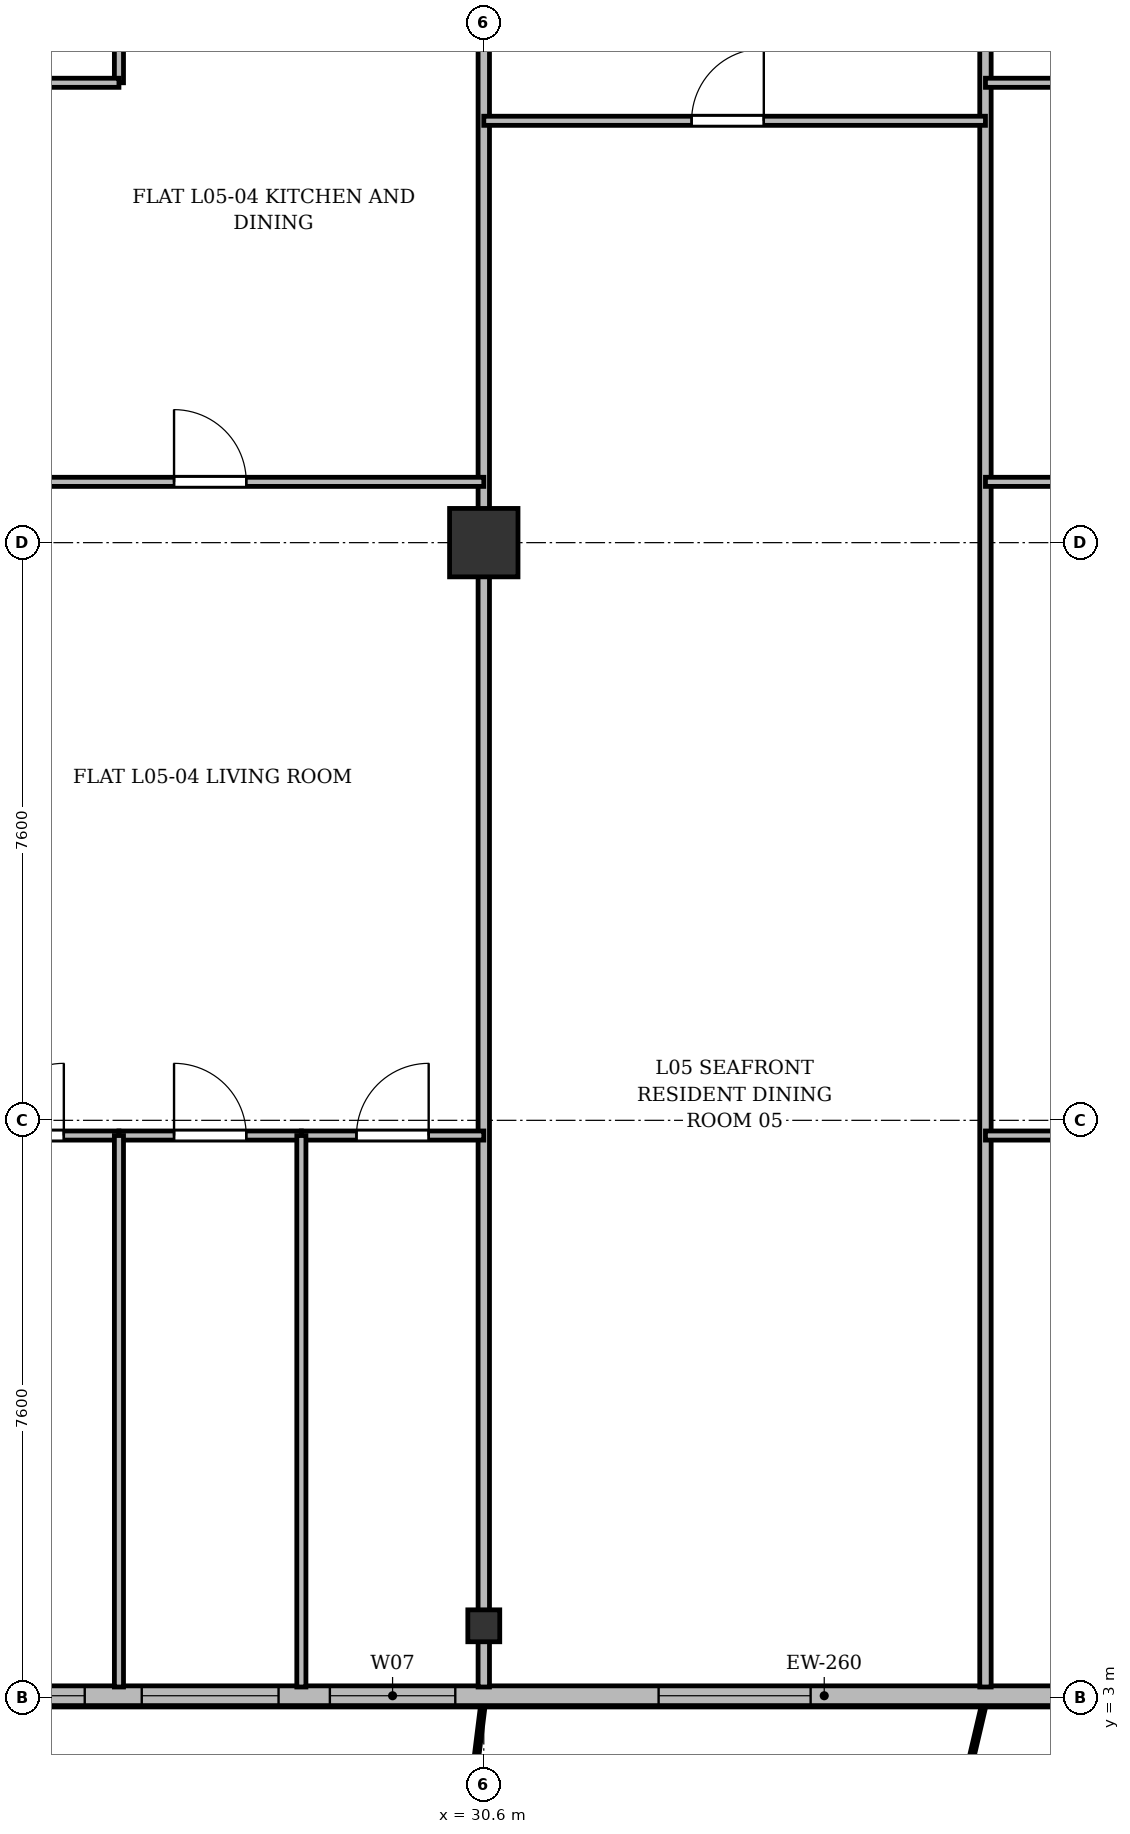
"""IFC4 building model, lengths in metres.
Left out: names, types, materials, properties, quantities, classifications, styles, units other than length and angle.
Written with IfcOpenShell. Run it as: python <this file> out.ifc"""

import sys

from ifc_helpers import new_model, si_unit, direction, frame, frame_2d, origin, origin_2d, place, context, subcontext, project, spatial, rectangle, i_section, extrude, source, transform, mapped, element, fill, save


model = new_model("IFC4")
c1 = context("Model", 3, precision=1e-05, world=origin(), true_north=direction((0.0, 1.0)))
c2 = subcontext(c1, "Body", "Model", "MODEL_VIEW")
j1 = project(units=[si_unit("LENGTHUNIT", "METRE"), si_unit("PLANEANGLEUNIT", "RADIAN")], contexts=[c1])
p1 = place(None, origin())
s1 = spatial("IfcSite", under=j1, at=p1, CompositionType="ELEMENT")
p2 = place(p1, origin())
s2 = spatial("IfcBuilding", under=s1, at=p2, CompositionType="ELEMENT")
p3 = place(p2, frame((0.0, 0.0, 23.5)))
s3 = spatial("IfcBuildingStorey", under=s2, at=p3, CompositionType="ELEMENT", Elevation=23.5)
m1 = source(origin(), c2, "Body", "SweptSolid", [
    extrude(i_section(OverallWidth=0.42, OverallDepth=0.42, WebThickness=0.026, FlangeThickness=0.04, at=origin_2d()), origin(), (0.0, 0.0, 1.0), 3.6),
])
p4 = place(p3, frame((30.6, 3.95, 0.0), z_axis=(0.0, 0.0, 1.0), x_axis=(1.0, 0.0, 0.0)))
e1 = element("IfcColumn", 1, at=p4, inside=s3, PredefinedType="COLUMN", context=c2, shape_type="MappedRepresentation", body=[
    mapped(m1, transform((0.0, 0.0, 0.0), x_axis=(1.0, 0.0, 0.0), y_axis=(0.0, 1.0, 0.0), z_axis=(0.0, 0.0, 1.0), scale=1.0)),
])
m2 = source(origin(), c2, "Body", "SweptSolid", [
    extrude(rectangle(XDim=0.9, YDim=0.9, at=origin_2d()), origin(), (0.0, 0.0, 1.0), 3.6),
])
p5 = place(p3, frame((30.6, 18.2, 0.0), z_axis=(0.0, 0.0, 1.0), x_axis=(1.0, 0.0, 0.0)))
e2 = element("IfcColumn", 2, at=p5, inside=s3, PredefinedType="COLUMN", context=c2, shape_type="MappedRepresentation", body=[
    mapped(m2, transform((0.0, 0.0, 0.0), x_axis=(1.0, 0.0, 0.0), y_axis=(0.0, 1.0, 0.0), z_axis=(0.0, 0.0, 1.0), scale=1.0)),
])
p6 = place(p3, frame((66.9, 3.03, 0.0), z_axis=(0.0, 0.0, 1.0), x_axis=(-1.0, 0.0, 0.0)))
e3 = element("IfcWall", 3, at=p6, inside=s3, PredefinedType="SOLIDWALL", context=c2, shape_type="SweptSolid", body=[
    extrude(rectangle(XDim=59.4, YDim=0.26, at=frame_2d((29.7, 0.0))), origin(), (0.0, 0.0, 1.0), 3.34),
])
p7 = place(p6, frame((3.6, 0.0, 0.9)))
e4 = element("IfcOpeningElement", 4, at=p7, cuts=e3, PredefinedType="OPENING", context=c2, shape_type="SweptSolid", body=[
    extrude(rectangle(XDim=2.2, YDim=1.8, at=frame_2d((1.1, 0.9))), frame((0.0, 0.14, 0.0), z_axis=(0.0, -1.0, 0.0), x_axis=(1.0, 0.0, 0.0)), (0.0, 0.0, 1.0), 0.28),
])
p8 = place(p6, frame((9.3, 0.0, 0.9)))
e5 = element("IfcOpeningElement", 5, at=p8, cuts=e3, PredefinedType="OPENING", context=c2, shape_type="SweptSolid", body=[
    extrude(rectangle(XDim=1.5, YDim=1.75, at=frame_2d((0.75, 0.875))), frame((0.0, 0.14, 0.0), z_axis=(0.0, -1.0, 0.0), x_axis=(1.0, 0.0, 0.0)), (0.0, 0.0, 1.0), 0.28),
])
p9 = place(p6, frame((12.95, 0.0, 0.9)))
e6 = element("IfcOpeningElement", 6, at=p9, cuts=e3, PredefinedType="OPENING", context=c2, shape_type="SweptSolid", body=[
    extrude(rectangle(XDim=2.0, YDim=1.95, at=frame_2d((1.0, 0.975))), frame((0.0, 0.14, 0.0), z_axis=(0.0, -1.0, 0.0), x_axis=(1.0, 0.0, 0.0)), (0.0, 0.0, 1.0), 0.28),
])
p10 = place(p6, frame((17.007, 0.0, 0.0)))
e7 = element("IfcOpeningElement", 7, at=p10, cuts=e3, PredefinedType="OPENING", context=c2, shape_type="SweptSolid", body=[
    extrude(rectangle(XDim=1.2, YDim=2.2, at=frame_2d((0.6, 1.1))), frame((0.0, 0.14, 0.0), z_axis=(0.0, -1.0, 0.0), x_axis=(1.0, 0.0, 0.0)), (0.0, 0.0, 1.0), 0.28),
])
p11 = place(p6, frame((20.4, 0.0, 0.9)))
e8 = element("IfcOpeningElement", 8, at=p11, cuts=e3, PredefinedType="OPENING", context=c2, shape_type="SweptSolid", body=[
    extrude(rectangle(XDim=1.8, YDim=1.8, at=frame_2d((0.9, 0.9))), frame((0.0, 0.14, 0.0), z_axis=(0.0, -1.0, 0.0), x_axis=(1.0, 0.0, 0.0)), (0.0, 0.0, 1.0), 0.28),
])
p12 = place(p6, frame((23.65, 0.0, 0.9)))
e9 = element("IfcOpeningElement", 9, at=p12, cuts=e3, PredefinedType="OPENING", context=c2, shape_type="SweptSolid", body=[
    extrude(rectangle(XDim=2.2, YDim=1.8, at=frame_2d((1.1, 0.9))), frame((0.0, 0.14, 0.0), z_axis=(0.0, -1.0, 0.0), x_axis=(1.0, 0.0, 0.0)), (0.0, 0.0, 1.0), 0.28),
])
p13 = place(p6, frame((27.3, 0.0, 0.9)))
e10 = element("IfcOpeningElement", 10, at=p13, cuts=e3, PredefinedType="OPENING", context=c2, shape_type="SweptSolid", body=[
    extrude(rectangle(XDim=1.5, YDim=1.75, at=frame_2d((0.75, 0.875))), frame((0.0, 0.14, 0.0), z_axis=(0.0, -1.0, 0.0), x_axis=(1.0, 0.0, 0.0)), (0.0, 0.0, 1.0), 0.28),
])
p14 = place(p6, frame((32.0, 0.0, 0.9)))
e11 = element("IfcOpeningElement", 11, at=p14, cuts=e3, PredefinedType="OPENING", context=c2, shape_type="SweptSolid", body=[
    extrude(rectangle(XDim=2.0, YDim=1.95, at=frame_2d((1.0, 0.975))), frame((0.0, 0.14, 0.0), z_axis=(0.0, -1.0, 0.0), x_axis=(1.0, 0.0, 0.0)), (0.0, 0.0, 1.0), 0.28),
])
p15 = place(p6, frame((36.675, 0.0, 0.9)))
e12 = element("IfcOpeningElement", 12, at=p15, cuts=e3, PredefinedType="OPENING", context=c2, shape_type="SweptSolid", body=[
    extrude(rectangle(XDim=1.65, YDim=1.85, at=frame_2d((0.825, 0.925))), frame((0.0, 0.14, 0.0), z_axis=(0.0, -1.0, 0.0), x_axis=(1.0, 0.0, 0.0)), (0.0, 0.0, 1.0), 0.28),
])
p16 = place(p6, frame((39.0, 0.0, 0.9)))
e13 = element("IfcOpeningElement", 13, at=p16, cuts=e3, PredefinedType="OPENING", context=c2, shape_type="SweptSolid", body=[
    extrude(rectangle(XDim=1.8, YDim=1.8, at=frame_2d((0.9, 0.9))), frame((0.0, 0.14, 0.0), z_axis=(0.0, -1.0, 0.0), x_axis=(1.0, 0.0, 0.0)), (0.0, 0.0, 1.0), 0.28),
])
p17 = place(p6, frame((41.55, 0.0, 0.9)))
e14 = element("IfcOpeningElement", 14, at=p17, cuts=e3, PredefinedType="OPENING", context=c2, shape_type="SweptSolid", body=[
    extrude(rectangle(XDim=1.5, YDim=1.75, at=frame_2d((0.75, 0.875))), frame((0.0, 0.14, 0.0), z_axis=(0.0, -1.0, 0.0), x_axis=(1.0, 0.0, 0.0)), (0.0, 0.0, 1.0), 0.28),
])
p18 = place(p6, frame((45.435, 0.0, 0.0)))
e15 = element("IfcOpeningElement", 15, at=p18, cuts=e3, PredefinedType="OPENING", context=c2, shape_type="SweptSolid", body=[
    extrude(rectangle(XDim=1.2, YDim=2.2, at=frame_2d((0.6, 1.1))), frame((0.0, 0.14, 0.0), z_axis=(0.0, -1.0, 0.0), x_axis=(1.0, 0.0, 0.0)), (0.0, 0.0, 1.0), 0.28),
])
p19 = place(p6, frame((48.35, 0.0, 0.9)))
e16 = element("IfcOpeningElement", 16, at=p19, cuts=e3, PredefinedType="OPENING", context=c2, shape_type="SweptSolid", body=[
    extrude(rectangle(XDim=2.0, YDim=1.95, at=frame_2d((1.0, 0.975))), frame((0.0, 0.14, 0.0), z_axis=(0.0, -1.0, 0.0), x_axis=(1.0, 0.0, 0.0)), (0.0, 0.0, 1.0), 0.28),
])
p20 = place(p6, frame((52.175, 0.0, 0.9)))
e17 = element("IfcOpeningElement", 17, at=p20, cuts=e3, PredefinedType="OPENING", context=c2, shape_type="SweptSolid", body=[
    extrude(rectangle(XDim=1.65, YDim=1.85, at=frame_2d((0.825, 0.925))), frame((0.0, 0.14, 0.0), z_axis=(0.0, -1.0, 0.0), x_axis=(1.0, 0.0, 0.0)), (0.0, 0.0, 1.0), 0.28),
])
p21 = place(p6, frame((55.5, 0.0, 0.9)))
e18 = element("IfcOpeningElement", 18, at=p21, cuts=e3, PredefinedType="OPENING", context=c2, shape_type="SweptSolid", body=[
    extrude(rectangle(XDim=1.8, YDim=1.8, at=frame_2d((0.9, 0.9))), frame((0.0, 0.14, 0.0), z_axis=(0.0, -1.0, 0.0), x_axis=(1.0, 0.0, 0.0)), (0.0, 0.0, 1.0), 0.28),
])
p22 = place(p3, frame((30.6, 3.145, 0.0), z_axis=(0.0, 0.0, 1.0), x_axis=(0.0, 1.0, 0.0)))
e19 = element("IfcWall", 19, at=p22, inside=s3, PredefinedType="PARTITIONING", context=c2, shape_type="SweptSolid", body=[
    extrude(rectangle(XDim=24.455, YDim=0.15, at=frame_2d((12.228, 0.0))), origin(), (0.0, 0.0, 1.0), 2.752),
])
p23 = place(p3, frame((37.2, 3.145, 0.0), z_axis=(0.0, 0.0, 1.0), x_axis=(0.0, 1.0, 0.0)))
e20 = element("IfcWall", 20, at=p23, inside=s3, PredefinedType="PARTITIONING", context=c2, shape_type="SweptSolid", body=[
    extrude(rectangle(XDim=24.455, YDim=0.15, at=frame_2d((12.228, 0.0))), origin(), (0.0, 0.0, 1.0), 2.69),
])
p24 = place(p3, frame((23.4, 19.0, 0.0), z_axis=(0.0, 0.0, 1.0), x_axis=(1.0, 0.0, 0.0)))
e21 = element("IfcWall", 21, at=p24, inside=s3, PredefinedType="PARTITIONING", context=c2, shape_type="SweptSolid", body=[
    extrude(rectangle(XDim=7.2, YDim=0.12, at=frame_2d((3.6, 0.0))), origin(), (0.0, 0.0, 1.0), 2.752),
])
p25 = place(p24, frame((3.125, 0.0, 0.0)))
e22 = element("IfcOpeningElement", 22, at=p25, cuts=e21, PredefinedType="OPENING", context=c2, shape_type="SweptSolid", body=[
    extrude(rectangle(XDim=0.95, YDim=2.15, at=frame_2d((0.475, 1.075))), frame((0.0, 0.07, 0.0), z_axis=(0.0, -1.0, 0.0), x_axis=(1.0, 0.0, 0.0)), (0.0, 0.0, 1.0), 0.14),
])
p26 = place(p3, frame((25.8, 24.25, 0.0), z_axis=(0.0, 0.0, 1.0), x_axis=(0.0, 1.0, 0.0)))
e23 = element("IfcWall", 23, at=p26, inside=s3, PredefinedType="PARTITIONING", context=c2, shape_type="SweptSolid", body=[
    extrude(rectangle(XDim=3.35, YDim=0.12, at=frame_2d((1.675, 0.0))), origin(), (0.0, 0.0, 1.0), 2.94),
])
p27 = place(p26, frame((0.8, 0.0, 0.0)))
e24 = element("IfcOpeningElement", 24, at=p27, cuts=e23, PredefinedType="OPENING", context=c2, shape_type="SweptSolid", body=[
    extrude(rectangle(XDim=0.85, YDim=2.1, at=frame_2d((0.425, 1.05))), frame((0.0, 0.07, 0.0), z_axis=(0.0, -1.0, 0.0), x_axis=(1.0, 0.0, 0.0)), (0.0, 0.0, 1.0), 0.14),
])
p28 = place(p3, frame((23.4, 24.25, 0.0), z_axis=(0.0, 0.0, 1.0), x_axis=(1.0, 0.0, 0.0)))
e25 = element("IfcWall", 25, at=p28, inside=s3, PredefinedType="PARTITIONING", context=c2, shape_type="SweptSolid", body=[
    extrude(rectangle(XDim=2.4, YDim=0.12, at=frame_2d((1.2, 0.0))), origin(), (0.0, 0.0, 1.0), 2.752),
])
p29 = place(p3, frame((23.4, 10.4, 0.0), z_axis=(0.0, 0.0, 1.0), x_axis=(1.0, 0.0, 0.0)))
e26 = element("IfcWall", 26, at=p29, inside=s3, PredefinedType="PARTITIONING", context=c2, shape_type="SweptSolid", body=[
    extrude(rectangle(XDim=2.4, YDim=0.12, at=frame_2d((1.2, 0.0))), origin(), (0.0, 0.0, 1.0), 2.752),
])
p30 = place(p29, frame((0.725, 0.0, 0.0)))
e27 = element("IfcOpeningElement", 27, at=p30, cuts=e26, PredefinedType="OPENING", context=c2, shape_type="SweptSolid", body=[
    extrude(rectangle(XDim=0.95, YDim=2.15, at=frame_2d((0.475, 1.075))), frame((0.0, 0.07, 0.0), z_axis=(0.0, -1.0, 0.0), x_axis=(1.0, 0.0, 0.0)), (0.0, 0.0, 1.0), 0.14),
])
p31 = place(p3, frame((25.8, 10.4, 0.0), z_axis=(0.0, 0.0, 1.0), x_axis=(1.0, 0.0, 0.0)))
e28 = element("IfcWall", 28, at=p31, inside=s3, PredefinedType="PARTITIONING", context=c2, shape_type="SweptSolid", body=[
    extrude(rectangle(XDim=2.4, YDim=0.12, at=frame_2d((1.2, 0.0))), origin(), (0.0, 0.0, 1.0), 3.34),
])
p32 = place(p31, frame((0.725, 0.0, 0.0)))
e29 = element("IfcOpeningElement", 29, at=p32, cuts=e28, PredefinedType="OPENING", context=c2, shape_type="SweptSolid", body=[
    extrude(rectangle(XDim=0.95, YDim=2.15, at=frame_2d((0.475, 1.075))), frame((0.0, 0.07, 0.0), z_axis=(0.0, -1.0, 0.0), x_axis=(1.0, 0.0, 0.0)), (0.0, 0.0, 1.0), 0.14),
])
p33 = place(p3, frame((25.8, 3.145, 0.0), z_axis=(0.0, 0.0, 1.0), x_axis=(0.0, 1.0, 0.0)))
e30 = element("IfcWall", 30, at=p33, inside=s3, PredefinedType="PARTITIONING", context=c2, shape_type="SweptSolid", body=[
    extrude(rectangle(XDim=7.255, YDim=0.12, at=frame_2d((3.627, 0.0))), origin(), (0.0, 0.0, 1.0), 2.69),
])
p34 = place(p3, frame((28.2, 10.4, 0.0), z_axis=(0.0, 0.0, 1.0), x_axis=(1.0, 0.0, 0.0)))
e31 = element("IfcWall", 31, at=p34, inside=s3, PredefinedType="PARTITIONING", context=c2, shape_type="SweptSolid", body=[
    extrude(rectangle(XDim=2.4, YDim=0.12, at=frame_2d((1.2, 0.0))), origin(), (0.0, 0.0, 1.0), 2.752),
])
p35 = place(p34, frame((0.725, 0.0, 0.0)))
e32 = element("IfcOpeningElement", 32, at=p35, cuts=e31, PredefinedType="OPENING", context=c2, shape_type="SweptSolid", body=[
    extrude(rectangle(XDim=0.95, YDim=2.15, at=frame_2d((0.475, 1.075))), frame((0.0, 0.07, 0.0), z_axis=(0.0, -1.0, 0.0), x_axis=(1.0, 0.0, 0.0)), (0.0, 0.0, 1.0), 0.14),
])
p36 = place(p3, frame((28.2, 3.145, 0.0), z_axis=(0.0, 0.0, 1.0), x_axis=(0.0, 1.0, 0.0)))
e33 = element("IfcWall", 33, at=p36, inside=s3, PredefinedType="PARTITIONING", context=c2, shape_type="SweptSolid", body=[
    extrude(rectangle(XDim=7.255, YDim=0.12, at=frame_2d((3.627, 0.0))), origin(), (0.0, 0.0, 1.0), 2.69),
])
p37 = place(p3, frame((30.6, 23.75, 0.0), z_axis=(0.0, 0.0, 1.0), x_axis=(1.0, 0.0, 0.0)))
e34 = element("IfcWall", 34, at=p37, inside=s3, PredefinedType="PARTITIONING", context=c2, shape_type="SweptSolid", body=[
    extrude(rectangle(XDim=6.6, YDim=0.12, at=frame_2d((3.3, 0.0))), origin(), (0.0, 0.0, 1.0), 2.752),
])
p38 = place(p37, frame((2.734, 0.0, 0.0)))
e35 = element("IfcOpeningElement", 35, at=p38, cuts=e34, PredefinedType="OPENING", context=c2, shape_type="SweptSolid", body=[
    extrude(rectangle(XDim=0.95, YDim=2.15, at=frame_2d((0.475, 1.075))), frame((0.0, 0.07, 0.0), z_axis=(0.0, -1.0, 0.0), x_axis=(1.0, 0.0, 0.0)), (0.0, 0.0, 1.0), 0.14),
])
p39 = place(p3, frame((37.2, 19.0, 0.0), z_axis=(0.0, 0.0, 1.0), x_axis=(1.0, 0.0, 0.0)))
e36 = element("IfcWall", 36, at=p39, inside=s3, PredefinedType="PARTITIONING", context=c2, shape_type="SweptSolid", body=[
    extrude(rectangle(XDim=6.6, YDim=0.12, at=frame_2d((3.3, 0.0))), origin(), (0.0, 0.0, 1.0), 2.752),
])
p40 = place(p39, frame((2.734, 0.0, 0.0)))
e37 = element("IfcOpeningElement", 37, at=p40, cuts=e36, PredefinedType="OPENING", context=c2, shape_type="SweptSolid", body=[
    extrude(rectangle(XDim=0.95, YDim=2.15, at=frame_2d((0.475, 1.075))), frame((0.0, 0.07, 0.0), z_axis=(0.0, -1.0, 0.0), x_axis=(1.0, 0.0, 0.0)), (0.0, 0.0, 1.0), 0.14),
])
p41 = place(p3, frame((37.2, 24.25, 0.0), z_axis=(0.0, 0.0, 1.0), x_axis=(1.0, 0.0, 0.0)))
e38 = element("IfcWall", 38, at=p41, inside=s3, PredefinedType="PARTITIONING", context=c2, shape_type="SweptSolid", body=[
    extrude(rectangle(XDim=2.294, YDim=0.12, at=frame_2d((1.147, 0.0))), origin(), (0.0, 0.0, 1.0), 3.34),
])
p42 = place(p3, frame((37.2, 10.4, 0.0), z_axis=(0.0, 0.0, 1.0), x_axis=(1.0, 0.0, 0.0)))
e39 = element("IfcWall", 39, at=p42, inside=s3, PredefinedType="PARTITIONING", context=c2, shape_type="SweptSolid", body=[
    extrude(rectangle(XDim=3.3, YDim=0.12, at=frame_2d((1.65, 0.0))), origin(), (0.0, 0.0, 1.0), 3.34),
])
p43 = place(p42, frame((1.175, 0.0, 0.0)))
e40 = element("IfcOpeningElement", 40, at=p43, cuts=e39, PredefinedType="OPENING", context=c2, shape_type="SweptSolid", body=[
    extrude(rectangle(XDim=0.95, YDim=2.15, at=frame_2d((0.475, 1.075))), frame((0.0, 0.07, 0.0), z_axis=(0.0, -1.0, 0.0), x_axis=(1.0, 0.0, 0.0)), (0.0, 0.0, 1.0), 0.14),
])
m3 = source(origin(), c2, "Body", "SweptSolid", [
    extrude(rectangle(XDim=2.0, YDim=1.95, at=frame_2d((1.0, 0.975))), frame((0.0, 0.03, 0.0), z_axis=(0.0, -1.0, 0.0), x_axis=(1.0, 0.0, 0.0)), (0.0, 0.0, 1.0), 0.06),
])
p44 = place(p14, origin())
e41 = element("IfcWindow", 41, at=p44, inside=s3, PartitioningType="SINGLE_PANEL", PredefinedType="WINDOW", context=c2, shape_type="MappedRepresentation", body=[
    mapped(m3, transform((0.0, 0.0, 0.0), x_axis=(1.0, 0.0, 0.0), y_axis=(0.0, 1.0, 0.0), z_axis=(0.0, 0.0, 1.0), scale=1.0)),
])
fill(e11, e41)
m4 = source(origin(), c2, "Body", "SweptSolid", [
    extrude(rectangle(XDim=1.65, YDim=1.85, at=frame_2d((0.825, 0.925))), frame((0.0, 0.03, 0.0), z_axis=(0.0, -1.0, 0.0), x_axis=(1.0, 0.0, 0.0)), (0.0, 0.0, 1.0), 0.06),
])
p45 = place(p15, origin())
e42 = element("IfcWindow", 42, at=p45, inside=s3, PartitioningType="SINGLE_PANEL", PredefinedType="WINDOW", context=c2, shape_type="MappedRepresentation", body=[
    mapped(m4, transform((0.0, 0.0, 0.0), x_axis=(1.0, 0.0, 0.0), y_axis=(0.0, 1.0, 0.0), z_axis=(0.0, 0.0, 1.0), scale=1.0)),
])
fill(e12, e42)
m5 = source(origin(), c2, "Body", "SweptSolid", [
    extrude(rectangle(XDim=1.8, YDim=1.8, at=frame_2d((0.9, 0.9))), frame((0.0, 0.03, 0.0), z_axis=(0.0, -1.0, 0.0), x_axis=(1.0, 0.0, 0.0)), (0.0, 0.0, 1.0), 0.06),
])
p46 = place(p16, origin())
e43 = element("IfcWindow", 43, at=p46, inside=s3, PartitioningType="SINGLE_PANEL", PredefinedType="WINDOW", context=c2, shape_type="MappedRepresentation", body=[
    mapped(m5, transform((0.0, 0.0, 0.0), x_axis=(1.0, 0.0, 0.0), y_axis=(0.0, 1.0, 0.0), z_axis=(0.0, 0.0, 1.0), scale=1.0)),
])
fill(e13, e43)
m6 = source(origin(), c2, "Body", "SweptSolid", [
    extrude(rectangle(XDim=1.5, YDim=1.75, at=frame_2d((0.75, 0.875))), frame((0.0, 0.03, 0.0), z_axis=(0.0, -1.0, 0.0), x_axis=(1.0, 0.0, 0.0)), (0.0, 0.0, 1.0), 0.06),
])
p47 = place(p17, origin())
e44 = element("IfcWindow", 44, at=p47, inside=s3, PartitioningType="SINGLE_PANEL", PredefinedType="WINDOW", context=c2, shape_type="MappedRepresentation", body=[
    mapped(m6, transform((0.0, 0.0, 0.0), x_axis=(1.0, 0.0, 0.0), y_axis=(0.0, 1.0, 0.0), z_axis=(0.0, 0.0, 1.0), scale=1.0)),
])
fill(e14, e44)
m7 = source(origin(), c2, "Body", "SweptSolid", [
    extrude(rectangle(XDim=0.95, YDim=2.15, at=frame_2d((0.475, 1.075))), frame((0.0, 0.025, 0.0), z_axis=(0.0, -1.0, 0.0), x_axis=(1.0, 0.0, 0.0)), (0.0, 0.0, 1.0), 0.05),
])
p48 = place(p25, origin())
e45 = element("IfcDoor", 45, at=p48, inside=s3, OperationType="SINGLE_SWING_LEFT", PredefinedType="DOOR", context=c2, shape_type="MappedRepresentation", body=[
    mapped(m7, transform((0.0, 0.0, 0.0), x_axis=(1.0, 0.0, 0.0), y_axis=(0.0, 1.0, 0.0), z_axis=(0.0, 0.0, 1.0), scale=1.0)),
])
fill(e22, e45)
p49 = place(p30, origin())
e46 = element("IfcDoor", 46, at=p49, inside=s3, OperationType="SINGLE_SWING_RIGHT", PredefinedType="DOOR", context=c2, shape_type="MappedRepresentation", body=[
    mapped(m7, transform((0.0, 0.0, 0.0), x_axis=(1.0, 0.0, 0.0), y_axis=(0.0, 1.0, 0.0), z_axis=(0.0, 0.0, 1.0), scale=1.0)),
])
fill(e27, e46)
p50 = place(p32, origin())
e47 = element("IfcDoor", 47, at=p50, inside=s3, OperationType="SINGLE_SWING_LEFT", PredefinedType="DOOR", context=c2, shape_type="MappedRepresentation", body=[
    mapped(m7, transform((0.0, 0.0, 0.0), x_axis=(1.0, 0.0, 0.0), y_axis=(0.0, 1.0, 0.0), z_axis=(0.0, 0.0, 1.0), scale=1.0)),
])
fill(e29, e47)
p51 = place(p35, origin())
e48 = element("IfcDoor", 48, at=p51, inside=s3, OperationType="SINGLE_SWING_RIGHT", PredefinedType="DOOR", context=c2, shape_type="MappedRepresentation", body=[
    mapped(m7, transform((0.0, 0.0, 0.0), x_axis=(1.0, 0.0, 0.0), y_axis=(0.0, 1.0, 0.0), z_axis=(0.0, 0.0, 1.0), scale=1.0)),
])
fill(e32, e48)
p52 = place(p38, origin())
e49 = element("IfcDoor", 49, at=p52, inside=s3, OperationType="SINGLE_SWING_RIGHT", PredefinedType="DOOR", context=c2, shape_type="MappedRepresentation", body=[
    mapped(m7, transform((0.0, 0.0, 0.0), x_axis=(1.0, 0.0, 0.0), y_axis=(0.0, 1.0, 0.0), z_axis=(0.0, 0.0, 1.0), scale=1.0)),
])
fill(e35, e49)
save(model, sys.argv[1])
